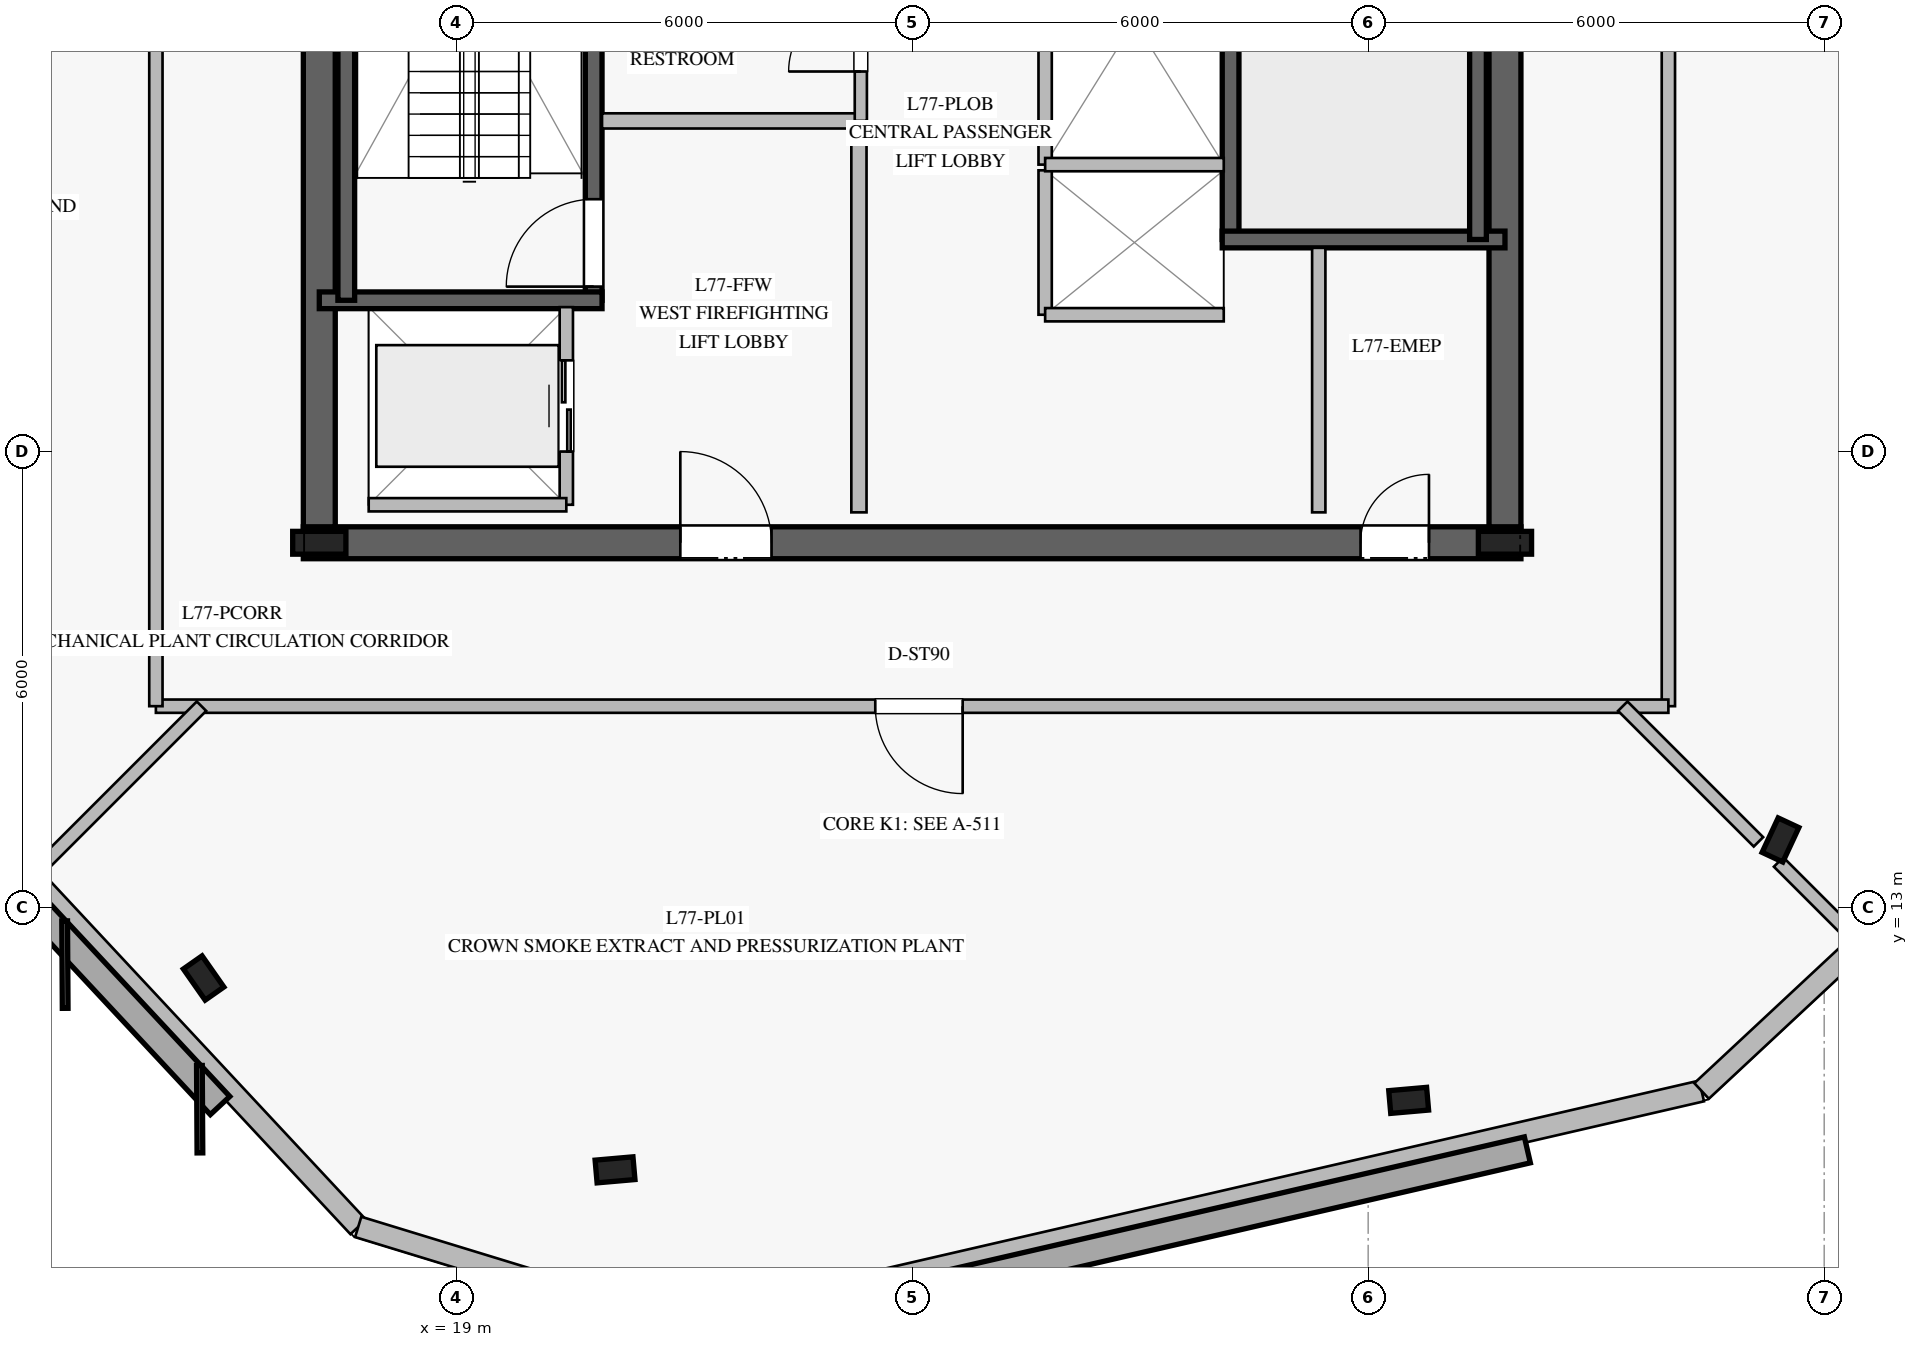
"""IFC4 building model, lengths in metres.
Left out: names, types, materials, properties, quantities, classifications, styles, units other than length and angle.
Written with IfcOpenShell. Run it as: python <this file> out.ifc"""

import sys

from ifc_helpers import new_model, si_unit, direction, frame, frame_2d, origin, origin_2d, place, context, subcontext, project, spatial, rectangle, i_section, extrude, element, fill, save


model = new_model("IFC4")
c1 = context("Model", 3, precision=1e-05, world=origin(), true_north=direction((0.0, 1.0)))
c2 = subcontext(c1, "Body", "Model", "MODEL_VIEW")
j1 = project(units=[si_unit("LENGTHUNIT", "METRE"), si_unit("PLANEANGLEUNIT", "RADIAN")], contexts=[c1])
p1 = place(None, origin())
s1 = spatial("IfcSite", under=j1, at=p1, CompositionType="ELEMENT")
p2 = place(p1, origin())
s2 = spatial("IfcBuilding", under=s1, at=p2, CompositionType="ELEMENT")
p3 = place(p2, frame((0.0, 0.0, 318.2)))
s3 = spatial("IfcBuildingStorey", under=s2, at=p3, CompositionType="ELEMENT", Elevation=318.2)
p4 = place(p3, frame((16.99, 17.8, 0.0), z_axis=(0.0, 0.0, 1.0), x_axis=(1.0, 0.0, 0.0)))
e1 = element("IfcWall", 1, at=p4, inside=s3, PredefinedType="SHEAR", context=c2, shape_type="SweptSolid", body=[
    extrude(rectangle(XDim=16.02, YDim=0.42, at=frame_2d((8.01, 0.0))), origin(), (0.0, 0.0, 1.0), 4.14),
])
p5 = place(p4, frame((4.96, 0.0, 0.0)))
e2 = element("IfcOpeningElement", 2, at=p5, cuts=e1, PredefinedType="OPENING", context=c2, shape_type="SweptSolid", body=[
    extrude(rectangle(XDim=1.2, YDim=2.25, at=frame_2d((0.6, 1.125))), frame((0.0, 0.22, 0.0), z_axis=(0.0, -1.0, 0.0), x_axis=(1.0, 0.0, 0.0)), (0.0, 0.0, 1.0), 0.44),
])
p6 = place(p4, frame((13.91, 0.0, 0.0)))
e3 = element("IfcOpeningElement", 3, at=p6, cuts=e1, PredefinedType="OPENING", context=c2, shape_type="SweptSolid", body=[
    extrude(rectangle(XDim=0.9, YDim=2.1, at=frame_2d((0.45, 1.05))), frame((0.0, 0.22, 0.0), z_axis=(0.0, -1.0, 0.0), x_axis=(1.0, 0.0, 0.0)), (0.0, 0.0, 1.0), 0.44),
])
p7 = place(p3, frame((17.2, 31.99, 0.0), z_axis=(0.0, 0.0, 1.0), x_axis=(0.0, -1.0, 0.0)))
e4 = element("IfcWall", 4, at=p7, inside=s3, PredefinedType="SHEAR", context=c2, shape_type="SweptSolid", body=[
    extrude(rectangle(XDim=13.98, YDim=0.42, at=frame_2d((6.99, 0.0))), origin(), (0.0, 0.0, 1.0), 4.14),
])
p8 = place(p7, frame((2.14, 0.0, 0.0)))
e5 = element("IfcOpeningElement", 5, at=p8, cuts=e4, PredefinedType="OPENING", context=c2, shape_type="SweptSolid", body=[
    extrude(rectangle(XDim=1.5, YDim=2.2, at=frame_2d((0.75, 1.1))), frame((0.0, 0.22, 0.0), z_axis=(0.0, -1.0, 0.0), x_axis=(1.0, 0.0, 0.0)), (0.0, 0.0, 1.0), 0.44),
])
p9 = place(p3, frame((32.8, 18.01, 0.0), z_axis=(0.0, 0.0, 1.0), x_axis=(0.0, 1.0, 0.0)))
e6 = element("IfcWall", 6, at=p9, inside=s3, PredefinedType="SHEAR", context=c2, shape_type="SweptSolid", body=[
    extrude(rectangle(XDim=13.98, YDim=0.42, at=frame_2d((6.99, 0.0))), origin(), (0.0, 0.0, 1.0), 4.14),
])
for number, where, z_axis, x_axis in (
    (7, (17.2, 17.8, 0.0), (0.0, 0.0, 1.0), (1.0, 0.0, 0.0)),
    (8, (32.8, 17.8, 0.0), (0.0, 0.0, 1.0), (1.0, 0.0, 0.0)),
):
    element("IfcColumn", number, at=place(p3, frame(where, z_axis=z_axis, x_axis=x_axis)), inside=s3, PredefinedType="COLUMN", context=c2, shape_type="SweptSolid", body=[
        extrude(i_section(OverallWidth=0.3, OverallDepth=0.7, WebThickness=0.017, FlangeThickness=0.032, at=origin_2d()), origin(), (0.0, 0.0, 1.0), 4.4),
    ])
p10 = place(p3, frame((20.81, 20.99, 0.0), z_axis=(0.0, 0.0, 1.0), x_axis=(0.0, 1.0, 0.0)))
e9 = element("IfcWall", 9, at=p10, inside=s3, PredefinedType="SOLIDWALL", context=c2, shape_type="SweptSolid", body=[
    extrude(rectangle(XDim=7.22, YDim=0.22, at=frame_2d((3.61, 0.0))), origin(), (0.0, 0.0, 1.0), 4.14),
])
p11 = place(p10, frame((0.18, 0.0, 0.0)))
e10 = element("IfcOpeningElement", 10, at=p11, cuts=e9, PredefinedType="OPENING", context=c2, shape_type="SweptSolid", body=[
    extrude(rectangle(XDim=1.15, YDim=2.2, at=frame_2d((0.575, 1.1))), frame((0.0, 0.12, 0.0), z_axis=(0.0, -1.0, 0.0), x_axis=(1.0, 0.0, 0.0)), (0.0, 0.0, 1.0), 0.24),
])
p12 = place(p3, frame((17.2, 20.99, 0.0), z_axis=(0.0, 0.0, 1.0), x_axis=(1.0, 0.0, 0.0)))
e11 = element("IfcWall", 11, at=p12, inside=s3, PredefinedType="SOLIDWALL", context=c2, shape_type="SweptSolid", body=[
    extrude(rectangle(XDim=3.72, YDim=0.22, at=frame_2d((1.86, 0.0))), origin(), (0.0, 0.0, 1.0), 4.14),
])
p13 = place(p3, frame((17.555, 28.21, 0.0), z_axis=(0.0, 0.0, 1.0), x_axis=(0.0, -1.0, 0.0)))
e12 = element("IfcWall", 12, at=p13, inside=s3, PredefinedType="SOLIDWALL", context=c2, shape_type="SweptSolid", body=[
    extrude(rectangle(XDim=7.22, YDim=0.22, at=frame_2d((3.61, 0.0))), origin(), (0.0, 0.0, 1.0), 4.14),
])
p14 = place(p3, frame((29.19, 21.79, 0.0), z_axis=(0.0, 0.0, 1.0), x_axis=(0.0, 1.0, 0.0)))
e13 = element("IfcWall", 13, at=p14, inside=s3, PredefinedType="SOLIDWALL", context=c2, shape_type="SweptSolid", body=[
    extrude(rectangle(XDim=7.22, YDim=0.22, at=frame_2d((3.61, 0.0))), origin(), (0.0, 0.0, 1.0), 4.14),
])
p15 = place(p14, frame((5.88, 0.0, 0.0)))
e14 = element("IfcOpeningElement", 14, at=p15, cuts=e13, PredefinedType="OPENING", context=c2, shape_type="SweptSolid", body=[
    extrude(rectangle(XDim=1.15, YDim=2.2, at=frame_2d((0.575, 1.1))), frame((0.0, 0.12, 0.0), z_axis=(0.0, -1.0, 0.0), x_axis=(1.0, 0.0, 0.0)), (0.0, 0.0, 1.0), 0.24),
])
p16 = place(p3, frame((29.08, 21.79, 0.0), z_axis=(0.0, 0.0, 1.0), x_axis=(1.0, 0.0, 0.0)))
e15 = element("IfcWall", 15, at=p16, inside=s3, PredefinedType="SOLIDWALL", context=c2, shape_type="SweptSolid", body=[
    extrude(rectangle(XDim=3.72, YDim=0.22, at=frame_2d((1.86, 0.0))), origin(), (0.0, 0.0, 1.0), 4.14),
])
p17 = place(p3, frame((32.445, 29.01, 0.0), z_axis=(0.0, 0.0, 1.0), x_axis=(0.0, -1.0, 0.0)))
e16 = element("IfcWall", 16, at=p17, inside=s3, PredefinedType="SOLIDWALL", context=c2, shape_type="SweptSolid", body=[
    extrude(rectangle(XDim=7.22, YDim=0.22, at=frame_2d((3.61, 0.0))), origin(), (0.0, 0.0, 1.0), 4.14),
])
for number, where, z_axis, x_axis in (
    (17, (15.678, 12.074, 0.0), (0.0, 0.0, 1.0), (-0.574, 0.819, 0.0)),
    (18, (21.091, 9.55, 0.0), (0.0, 0.0, 1.0), (0.996, 0.087, 0.0)),
    (19, (31.533, 10.464, 0.0), (0.0, 0.0, 1.0), (0.996, 0.087, 0.0)),
    (20, (36.425, 13.89, 0.0), (0.0, 0.0, 1.0), (0.423, 0.906, 0.0)),
):
    element("IfcColumn", number, at=place(p3, frame(where, z_axis=z_axis, x_axis=x_axis)), inside=s3, PredefinedType="COLUMN", context=c2, shape_type="SweptSolid", body=[
        extrude(i_section(OverallWidth=0.3, OverallDepth=0.5, WebThickness=0.014, FlangeThickness=0.028, at=origin_2d()), origin(), (0.0, 0.0, 1.0), 4.4),
    ])
p18 = place(p3, frame((8.329, 18.86, 0.0), z_axis=(0.0, 0.0, 1.0), x_axis=(0.682027341853, -0.731326674588, 0.0)))
e21 = element("IfcWall", 21, at=p18, inside=s3, PredefinedType="STANDARD", context=c2, shape_type="SweptSolid", body=[
    extrude(rectangle(XDim=13.757, YDim=0.28, at=frame_2d((6.879, 0.0))), origin(), (0.0, 0.0, 1.0), 4.14),
])
p19 = place(p3, frame((17.712, 8.799, 0.0), z_axis=(0.0, 0.0, 1.0), x_axis=(0.956262395438, -0.292510223876, 0.0)))
e22 = element("IfcWall", 22, at=p19, inside=s3, PredefinedType="STANDARD", context=c2, shape_type="SweptSolid", body=[
    extrude(rectangle(XDim=4.465, YDim=0.28, at=frame_2d((2.233, 0.0))), origin(), (0.0, 0.0, 1.0), 4.14),
])
p20 = place(p3, frame((21.982, 7.493, 0.0), z_axis=(0.0, 0.0, 1.0), x_axis=(0.974367263291, 0.224963188605, 0.0)))
e23 = element("IfcWall", 23, at=p20, inside=s3, PredefinedType="STANDARD", context=c2, shape_type="SweptSolid", body=[
    extrude(rectangle(XDim=13.758, YDim=0.28, at=frame_2d((6.879, 0.0))), origin(), (0.0, 0.0, 1.0), 4.14),
])
p21 = place(p3, frame((35.387, 10.588, 0.0), z_axis=(0.0, 0.0, 1.0), x_axis=(0.731311609652, 0.682043495378, 0.0)))
e24 = element("IfcWall", 24, at=p21, inside=s3, PredefinedType="STANDARD", context=c2, shape_type="SweptSolid", body=[
    extrude(rectangle(XDim=4.465, YDim=0.28, at=frame_2d((2.232, 0.0))), origin(), (0.0, 0.0, 1.0), 4.14),
])
p22 = place(p3, frame((24.3, 18.2, 0.0), z_axis=(0.0, 0.0, 1.0), x_axis=(0.0, 1.0, 0.0)))
e25 = element("IfcWall", 25, at=p22, inside=s3, PredefinedType="PARTITIONING", context=c2, shape_type="SweptSolid", body=[
    extrude(rectangle(XDim=5.15, YDim=0.2, at=frame_2d((2.575, 0.0))), origin(), (0.0, 0.0, 1.0), 4.14),
])
p23 = place(p3, frame((20.92, 23.35, 0.0), z_axis=(0.0, 0.0, 1.0), x_axis=(1.0, 0.0, 0.0)))
e26 = element("IfcWall", 26, at=p23, inside=s3, PredefinedType="PARTITIONING", context=c2, shape_type="SweptSolid", body=[
    extrude(rectangle(XDim=3.38, YDim=0.2, at=frame_2d((1.69, 0.0))), origin(), (0.0, 0.0, 1.0), 4.14),
])
p24 = place(p3, frame((24.325, 23.35, 0.0), z_axis=(0.0, 0.0, 1.0), x_axis=(0.0, 1.0, 0.0)))
e27 = element("IfcWall", 27, at=p24, inside=s3, PredefinedType="PLUMBINGWALL", context=c2, shape_type="SweptSolid", body=[
    extrude(rectangle(XDim=4.93, YDim=0.16, at=frame_2d((2.465, 0.0))), origin(), (0.0, 0.0, 1.0), 4.14),
])
p25 = place(p24, frame((0.65, 0.0, 0.0)))
e28 = element("IfcOpeningElement", 28, at=p25, cuts=e27, PredefinedType="OPENING", context=c2, shape_type="SweptSolid", body=[
    extrude(rectangle(XDim=0.95, YDim=2.1, at=frame_2d((0.475, 1.05))), frame((0.0, 0.09, 0.0), z_axis=(0.0, -1.0, 0.0), x_axis=(1.0, 0.0, 0.0)), (0.0, 0.0, 1.0), 0.18),
])
p26 = place(p24, frame((3.11, 0.0, 0.0)))
e29 = element("IfcOpeningElement", 29, at=p26, cuts=e27, PredefinedType="OPENING", context=c2, shape_type="SweptSolid", body=[
    extrude(rectangle(XDim=0.9, YDim=2.1, at=frame_2d((0.45, 1.05))), frame((0.0, 0.09, 0.0), z_axis=(0.0, -1.0, 0.0), x_axis=(1.0, 0.0, 0.0)), (0.0, 0.0, 1.0), 0.18),
])
p27 = place(p3, frame((30.35, 18.2, 0.0), z_axis=(0.0, 0.0, 1.0), x_axis=(0.0, 1.0, 0.0)))
e30 = element("IfcWall", 30, at=p27, inside=s3, PredefinedType="PARTITIONING", context=c2, shape_type="SweptSolid", body=[
    extrude(rectangle(XDim=3.48, YDim=0.175, at=frame_2d((1.74, 0.0))), origin(), (0.0, 0.0, 1.0), 4.14),
])
p28 = place(p3, frame((26.75, 20.8, 0.0), z_axis=(0.0, 0.0, 1.0), x_axis=(0.0, 1.0, 0.0)))
e31 = element("IfcWall", 31, at=p28, inside=s3, PredefinedType="PARTITIONING", context=c2, shape_type="SweptSolid", body=[
    extrude(rectangle(XDim=1.9, YDim=0.175, at=frame_2d((0.95, 0.0))), origin(), (0.0, 0.0, 1.0), 4.14),
])
p29 = place(p3, frame((26.75, 20.8, 0.0), z_axis=(0.0, 0.0, 1.0), x_axis=(1.0, 0.0, 0.0)))
e32 = element("IfcWall", 32, at=p29, inside=s3, PredefinedType="PARTITIONING", context=c2, shape_type="SweptSolid", body=[
    extrude(rectangle(XDim=2.35, YDim=0.175, at=frame_2d((1.175, 0.0))), origin(), (0.0, 0.0, 1.0), 4.14),
])
p30 = place(p3, frame((26.75, 22.775, 0.0), z_axis=(0.0, 0.0, 1.0), x_axis=(0.0, 1.0, 0.0)))
e33 = element("IfcWall", 33, at=p30, inside=s3, PredefinedType="PARTITIONING", context=c2, shape_type="SweptSolid", body=[
    extrude(rectangle(XDim=1.9, YDim=0.175, at=frame_2d((0.95, 0.0))), origin(), (0.0, 0.0, 1.0), 4.14),
])
p31 = place(p3, frame((26.75, 22.775, 0.0), z_axis=(0.0, 0.0, 1.0), x_axis=(1.0, 0.0, 0.0)))
e34 = element("IfcWall", 34, at=p31, inside=s3, PredefinedType="PARTITIONING", context=c2, shape_type="SweptSolid", body=[
    extrude(rectangle(XDim=2.35, YDim=0.175, at=frame_2d((1.175, 0.0))), origin(), (0.0, 0.0, 1.0), 4.14),
])
p32 = place(p3, frame((20.45, 18.3, 0.0), z_axis=(0.0, 0.0, 1.0), x_axis=(0.0, 1.0, 0.0)))
e35 = element("IfcWall", 35, at=p32, inside=s3, PredefinedType="PARTITIONING", context=c2, shape_type="SweptSolid", body=[
    extrude(rectangle(XDim=2.6, YDim=0.175, at=frame_2d((1.3, 0.0))), origin(), (0.0, 0.0, 1.0), 4.14),
])
p33 = place(p32, frame((0.7, 0.0, 0.0)))
e36 = element("IfcOpeningElement", 36, at=p33, cuts=e35, PredefinedType="OPENING", context=c2, shape_type="SweptSolid", body=[
    extrude(rectangle(XDim=1.2, YDim=2.2, at=frame_2d((0.6, 1.1))), frame((0.0, 0.098, 0.0), z_axis=(0.0, -1.0, 0.0), x_axis=(1.0, 0.0, 0.0)), (0.0, 0.0, 1.0), 0.195),
])
p34 = place(p3, frame((17.85, 18.3, 0.0), z_axis=(0.0, 0.0, 1.0), x_axis=(1.0, 0.0, 0.0)))
e37 = element("IfcWall", 37, at=p34, inside=s3, PredefinedType="PARTITIONING", context=c2, shape_type="SweptSolid", body=[
    extrude(rectangle(XDim=2.6, YDim=0.175, at=frame_2d((1.3, 0.0))), origin(), (0.0, 0.0, 1.0), 4.14),
])
p35 = place(p3, frame((34.95, 34.35, 0.0), z_axis=(0.0, 0.0, 1.0), x_axis=(0.0, -1.0, 0.0)))
e38 = element("IfcWall", 38, at=p35, inside=s3, PredefinedType="PARTITIONING", context=c2, shape_type="SweptSolid", body=[
    extrude(rectangle(XDim=18.7, YDim=0.175, at=frame_2d((9.35, 0.0))), origin(), (0.0, 0.0, 1.0), 3.64),
])
p36 = place(p35, frame((8.775, 0.0, 0.0)))
e39 = element("IfcOpeningElement", 39, at=p36, cuts=e38, PredefinedType="OPENING", context=c2, shape_type="SweptSolid", body=[
    extrude(rectangle(XDim=1.15, YDim=2.2, at=frame_2d((0.575, 1.1))), frame((0.0, 0.098, 0.0), z_axis=(0.0, -1.0, 0.0), x_axis=(1.0, 0.0, 0.0)), (0.0, 0.0, 1.0), 0.195),
])
p37 = place(p3, frame((34.95, 15.65, 0.0), z_axis=(0.0, 0.0, 1.0), x_axis=(-1.0, 0.0, 0.0)))
e40 = element("IfcWall", 40, at=p37, inside=s3, PredefinedType="PARTITIONING", context=c2, shape_type="SweptSolid", body=[
    extrude(rectangle(XDim=19.9, YDim=0.175, at=frame_2d((9.95, 0.0))), origin(), (0.0, 0.0, 1.0), 3.64),
])
p38 = place(p37, frame((9.285, 0.0, 0.0)))
e41 = element("IfcOpeningElement", 41, at=p38, cuts=e40, PredefinedType="OPENING", context=c2, shape_type="SweptSolid", body=[
    extrude(rectangle(XDim=1.15, YDim=2.2, at=frame_2d((0.575, 1.1))), frame((0.0, 0.098, 0.0), z_axis=(0.0, -1.0, 0.0), x_axis=(1.0, 0.0, 0.0)), (0.0, 0.0, 1.0), 0.195),
])
p39 = place(p3, frame((15.05, 15.65, 0.0), z_axis=(0.0, 0.0, 1.0), x_axis=(0.0, 1.0, 0.0)))
e42 = element("IfcWall", 42, at=p39, inside=s3, PredefinedType="PARTITIONING", context=c2, shape_type="SweptSolid", body=[
    extrude(rectangle(XDim=18.7, YDim=0.175, at=frame_2d((9.35, 0.0))), origin(), (0.0, 0.0, 1.0), 3.64),
])
p40 = place(p39, frame((8.775, 0.0, 0.0)))
e43 = element("IfcOpeningElement", 43, at=p40, cuts=e42, PredefinedType="OPENING", context=c2, shape_type="SweptSolid", body=[
    extrude(rectangle(XDim=1.15, YDim=2.2, at=frame_2d((0.575, 1.1))), frame((0.0, 0.098, 0.0), z_axis=(0.0, -1.0, 0.0), x_axis=(1.0, 0.0, 0.0)), (0.0, 0.0, 1.0), 0.195),
])
p41 = place(p3, frame((15.65, 15.65, 0.0), z_axis=(0.0, 0.0, 1.0), x_axis=(-0.707106781187, -0.707106781187, 0.0)))
e44 = element("IfcWall", 44, at=p41, inside=s3, PredefinedType="PARTITIONING", context=c2, shape_type="SweptSolid", body=[
    extrude(rectangle(XDim=3.096, YDim=0.175, at=frame_2d((1.548, 0.0))), origin(), (0.0, 0.0, 1.0), 3.64),
])
p42 = place(p3, frame((34.35, 15.65, 0.0), z_axis=(0.0, 0.0, 1.0), x_axis=(0.707106781187, -0.707106781187, 0.0)))
e45 = element("IfcWall", 45, at=p42, inside=s3, PredefinedType="PARTITIONING", context=c2, shape_type="SweptSolid", body=[
    extrude(rectangle(XDim=2.524, YDim=0.175, at=frame_2d((1.262, 0.0))), origin(), (0.0, 0.0, 1.0), 3.64),
])
p43 = place(p3, frame((36.4, 13.6, 0.0), z_axis=(0.0, 0.0, 1.0), x_axis=(0.707106781187, -0.707106781187, 0.0)))
e46 = element("IfcWall", 46, at=p43, inside=s3, PredefinedType="PARTITIONING", context=c2, shape_type="SweptSolid", body=[
    extrude(rectangle(XDim=1.453, YDim=0.175, at=frame_2d((0.726, 0.0))), origin(), (0.0, 0.0, 1.0), 3.64),
])
p44 = place(p11, origin())
e47 = element("IfcDoor", 47, at=p44, inside=s3, OperationType="SINGLE_SWING_LEFT", PredefinedType="DOOR", context=c2, shape_type="SweptSolid", body=[
    extrude(rectangle(XDim=1.15, YDim=2.2, at=frame_2d((0.575, 1.1))), frame((0.0, 0.025, 0.0), z_axis=(0.0, -1.0, 0.0), x_axis=(1.0, 0.0, 0.0)), (0.0, 0.0, 1.0), 0.05),
])
fill(e10, e47)
p45 = place(p5, origin())
e48 = element("IfcDoor", 48, at=p45, inside=s3, OperationType="SINGLE_SWING_LEFT", PredefinedType="DOOR", context=c2, shape_type="SweptSolid", body=[
    extrude(rectangle(XDim=1.2, YDim=2.25, at=frame_2d((0.6, 1.125))), frame((0.0, 0.025, 0.0), z_axis=(0.0, -1.0, 0.0), x_axis=(1.0, 0.0, 0.0)), (0.0, 0.0, 1.0), 0.05),
])
fill(e2, e48)
p46 = place(p25, origin())
e49 = element("IfcDoor", 49, at=p46, inside=s3, OperationType="SINGLE_SWING_LEFT", PredefinedType="DOOR", context=c2, shape_type="SweptSolid", body=[
    extrude(rectangle(XDim=0.95, YDim=2.1, at=frame_2d((0.475, 1.05))), frame((0.0, 0.025, 0.0), z_axis=(0.0, -1.0, 0.0), x_axis=(1.0, 0.0, 0.0)), (0.0, 0.0, 1.0), 0.05),
])
fill(e28, e49)
p47 = place(p6, origin())
e50 = element("IfcDoor", 50, at=p47, inside=s3, OperationType="SINGLE_SWING_RIGHT", PredefinedType="DOOR", context=c2, shape_type="SweptSolid", body=[
    extrude(rectangle(XDim=0.9, YDim=2.1, at=frame_2d((0.45, 1.05))), frame((0.0, 0.025, 0.0), z_axis=(0.0, -1.0, 0.0), x_axis=(1.0, 0.0, 0.0)), (0.0, 0.0, 1.0), 0.05),
])
fill(e3, e50)
p48 = place(p33, origin())
e51 = element("IfcDoor", 51, at=p48, inside=s3, OperationType="DOUBLE_DOOR_SLIDING", PredefinedType="DOOR", context=c2, shape_type="SweptSolid", body=[
    extrude(rectangle(XDim=1.2, YDim=2.2, at=frame_2d((0.6, 1.1))), frame((0.0, 0.025, 0.0), z_axis=(0.0, -1.0, 0.0), x_axis=(1.0, 0.0, 0.0)), (0.0, 0.0, 1.0), 0.05),
])
fill(e36, e51)
p49 = place(p38, origin())
e52 = element("IfcDoor", 52, at=p49, inside=s3, OperationType="SINGLE_SWING_LEFT", PredefinedType="DOOR", context=c2, shape_type="SweptSolid", body=[
    extrude(rectangle(XDim=1.15, YDim=2.2, at=frame_2d((0.575, 1.1))), frame((0.0, 0.025, 0.0), z_axis=(0.0, -1.0, 0.0), x_axis=(1.0, 0.0, 0.0)), (0.0, 0.0, 1.0), 0.05),
])
fill(e41, e52)
save(model, sys.argv[1])
